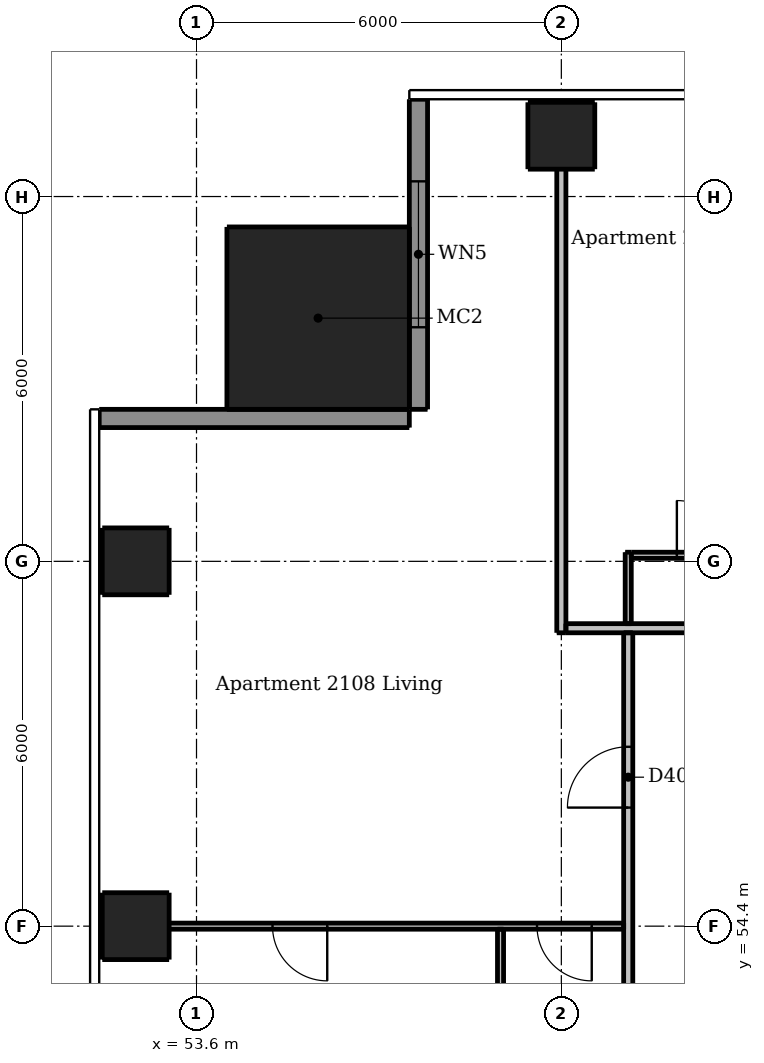
"""IFC4 building model, lengths in metres.
Left out: names, types, materials, properties, quantities, classifications, styles, units other than length and angle.
Written with IfcOpenShell. Run it as: python <this file> out.ifc"""

import sys

from ifc_helpers import new_model, si_unit, direction, frame, frame_2d, origin, origin_2d, place, context, subcontext, project, spatial, rectangle, extrude, element, fill, save


model = new_model("IFC4")
c1 = context("Model", 3, precision=1e-05, world=origin(), true_north=direction((0.0, 1.0)))
c2 = subcontext(c1, "Body", "Model", "MODEL_VIEW")
j1 = project(units=[si_unit("LENGTHUNIT", "METRE"), si_unit("PLANEANGLEUNIT", "RADIAN")], contexts=[c1])
p1 = place(None, origin())
s1 = spatial("IfcSite", under=j1, at=p1, CompositionType="ELEMENT")
p2 = place(p1, origin())
s2 = spatial("IfcBuilding", under=s1, at=p2, CompositionType="ELEMENT")
p3 = place(p2, frame((0.0, 0.0, 82.0)))
s3 = spatial("IfcBuildingStorey", under=s2, at=p3, CompositionType="ELEMENT", Elevation=82.0)
for number, where, z_axis, x_axis in (
    (1, (59.6, 67.4, 0.0), (0.0, 0.0, 1.0), (1.0, 0.0, 0.0)),
    (2, (52.6, 54.4, 0.0), (0.0, 0.0, 1.0), (1.0, 0.0, 0.0)),
    (3, (52.6, 60.4, 0.0), (0.0, 0.0, 1.0), (1.0, 0.0, 0.0)),
):
    element("IfcColumn", number, at=place(p3, frame(where, z_axis=z_axis, x_axis=x_axis)), inside=s3, PredefinedType="COLUMN", context=c2, shape_type="SweptSolid", body=[
        extrude(rectangle(XDim=1.1, YDim=1.1, at=origin_2d()), origin(), (0.0, 0.0, 1.0), 3.05),
    ])
p4 = place(p3, frame((55.6, 64.4, 0.0), z_axis=(0.0, 0.0, 1.0), x_axis=(1.0, 0.0, 0.0)))
e4 = element("IfcColumn", 4, at=p4, inside=s3, PredefinedType="COLUMN", context=c2, shape_type="SweptSolid", body=[
    extrude(rectangle(XDim=3.0, YDim=3.0, at=origin_2d()), origin(), (0.0, 0.0, 1.0), 3.3),
])
p5 = place(p3, frame((57.25, 68.0, 0.0), z_axis=(0.0, 0.0, 1.0), x_axis=(0.0, -1.0, 0.0)))
e5 = element("IfcWall", 5, at=p5, inside=s3, PredefinedType="SOLIDWALL", context=c2, shape_type="SweptSolid", body=[
    extrude(rectangle(XDim=5.1, YDim=0.3, at=frame_2d((2.55, 0.0))), origin(), (0.0, 0.0, 1.0), 3.05),
])
p6 = place(p5, frame((1.35, 0.0, 0.15)))
e6 = element("IfcOpeningElement", 6, at=p6, cuts=e5, PredefinedType="OPENING", context=c2, shape_type="SweptSolid", body=[
    extrude(rectangle(XDim=2.4, YDim=2.1, at=frame_2d((1.2, 1.05))), frame((0.0, 0.16, 0.0), z_axis=(0.0, -1.0, 0.0), x_axis=(1.0, 0.0, 0.0)), (0.0, 0.0, 1.0), 0.32),
])
p7 = place(p3, frame((57.1, 62.75, 0.0), z_axis=(0.0, 0.0, 1.0), x_axis=(-1.0, 0.0, 0.0)))
e7 = element("IfcWall", 7, at=p7, inside=s3, PredefinedType="SOLIDWALL", context=c2, shape_type="SweptSolid", body=[
    extrude(rectangle(XDim=5.1, YDim=0.3, at=frame_2d((2.55, 0.0))), origin(), (0.0, 0.0, 1.0), 3.05),
])
p8 = place(p3, frame((58.6, 54.35, 0.0), z_axis=(0.0, 0.0, 1.0), x_axis=(0.0, -1.0, 0.0)))
e8 = element("IfcWall", 8, at=p8, inside=s3, PredefinedType="PARTITIONING", context=c2, shape_type="SweptSolid", body=[
    extrude(rectangle(XDim=5.875, YDim=0.1, at=frame_2d((2.938, 0.0))), origin(), (0.0, 0.0, 1.0), 3.05),
])
p9 = place(p8, frame((3.75, 0.0, 0.0)))
e9 = element("IfcOpeningElement", 9, at=p9, cuts=e8, PredefinedType="OPENING", context=c2, shape_type="SweptSolid", body=[
    extrude(rectangle(XDim=0.8, YDim=2.1, at=frame_2d((0.4, 1.05))), frame((0.0, 0.06, 0.0), z_axis=(0.0, -1.0, 0.0), x_axis=(1.0, 0.0, 0.0)), (0.0, 0.0, 1.0), 0.12),
])
p10 = place(p3, frame((60.7, 59.375, 0.0), z_axis=(0.0, 0.0, 1.0), x_axis=(0.0, 1.0, 0.0)))
e10 = element("IfcWall", 10, at=p10, inside=s3, PredefinedType="PARTITIONING", context=c2, shape_type="SweptSolid", body=[
    extrude(rectangle(XDim=1.175, YDim=0.1, at=frame_2d((0.587, 0.0))), origin(), (0.0, 0.0, 1.0), 3.05),
])
p11 = place(p3, frame((60.75, 60.5, 0.0), z_axis=(0.0, 0.0, 1.0), x_axis=(1.0, 0.0, 0.0)))
e11 = element("IfcWall", 11, at=p11, inside=s3, PredefinedType="PARTITIONING", context=c2, shape_type="SweptSolid", body=[
    extrude(rectangle(XDim=16.775, YDim=0.1, at=frame_2d((8.387, 0.0))), origin(), (0.0, 0.0, 1.0), 3.05),
])
p12 = place(p11, frame((8.9, 0.0, 0.0)))
e12 = element("IfcOpeningElement", 12, at=p12, cuts=e11, PredefinedType="OPENING", context=c2, shape_type="SweptSolid", body=[
    extrude(rectangle(XDim=0.9, YDim=2.1, at=frame_2d((0.45, 1.05))), frame((0.0, 0.06, 0.0), z_axis=(0.0, -1.0, 0.0), x_axis=(1.0, 0.0, 0.0)), (0.0, 0.0, 1.0), 0.12),
])
p13 = place(p11, frame((14.9, 0.0, 0.0)))
e13 = element("IfcOpeningElement", 13, at=p13, cuts=e11, PredefinedType="OPENING", context=c2, shape_type="SweptSolid", body=[
    extrude(rectangle(XDim=0.9, YDim=2.1, at=frame_2d((0.45, 1.05))), frame((0.0, 0.06, 0.0), z_axis=(0.0, -1.0, 0.0), x_axis=(1.0, 0.0, 0.0)), (0.0, 0.0, 1.0), 0.12),
])
p14 = place(p11, frame((12.5, 0.0, 0.0)))
e14 = element("IfcOpeningElement", 14, at=p14, cuts=e11, PredefinedType="OPENING", context=c2, shape_type="SweptSolid", body=[
    extrude(rectangle(XDim=0.9, YDim=2.1, at=frame_2d((0.45, 1.05))), frame((0.0, 0.06, 0.0), z_axis=(0.0, -1.0, 0.0), x_axis=(1.0, 0.0, 0.0)), (0.0, 0.0, 1.0), 0.12),
])
p15 = place(p11, frame((5.35, 0.0, 0.0)))
e15 = element("IfcOpeningElement", 15, at=p15, cuts=e11, PredefinedType="OPENING", context=c2, shape_type="SweptSolid", body=[
    extrude(rectangle(XDim=0.8, YDim=2.1, at=frame_2d((0.4, 1.05))), frame((0.0, 0.06, 0.0), z_axis=(0.0, -1.0, 0.0), x_axis=(1.0, 0.0, 0.0)), (0.0, 0.0, 1.0), 0.12),
])
p16 = place(p11, frame((0.75, 0.0, 0.0)))
e16 = element("IfcOpeningElement", 16, at=p16, cuts=e11, PredefinedType="OPENING", context=c2, shape_type="SweptSolid", body=[
    extrude(rectangle(XDim=0.9, YDim=2.1, at=frame_2d((0.45, 1.05))), frame((0.0, 0.06, 0.0), z_axis=(0.0, -1.0, 0.0), x_axis=(1.0, 0.0, 0.0)), (0.0, 0.0, 1.0), 0.12),
])
p17 = place(p11, frame((3.25, 0.0, 0.0)))
e17 = element("IfcOpeningElement", 17, at=p17, cuts=e11, PredefinedType="OPENING", context=c2, shape_type="SweptSolid", body=[
    extrude(rectangle(XDim=0.8, YDim=2.1, at=frame_2d((0.4, 1.05))), frame((0.0, 0.06, 0.0), z_axis=(0.0, -1.0, 0.0), x_axis=(1.0, 0.0, 0.0)), (0.0, 0.0, 1.0), 0.12),
])
p18 = place(p3, frame((60.625, 54.4, 0.0), z_axis=(0.0, 0.0, 1.0), x_axis=(-1.0, 0.0, 0.0)))
e18 = element("IfcWall", 18, at=p18, inside=s3, PredefinedType="PARTITIONING", context=c2, shape_type="SweptSolid", body=[
    extrude(rectangle(XDim=8.625, YDim=0.1, at=frame_2d((4.312, 0.0))), origin(), (0.0, 0.0, 1.0), 2.516),
])
p19 = place(p18, frame((0.525, 0.0, 0.0)))
e19 = element("IfcOpeningElement", 19, at=p19, cuts=e18, PredefinedType="OPENING", context=c2, shape_type="SweptSolid", body=[
    extrude(rectangle(XDim=0.9, YDim=2.1, at=frame_2d((0.45, 1.05))), frame((0.0, 0.06, 0.0), z_axis=(0.0, -1.0, 0.0), x_axis=(1.0, 0.0, 0.0)), (0.0, 0.0, 1.0), 0.12),
])
p20 = place(p18, frame((4.875, 0.0, 0.0)))
e20 = element("IfcOpeningElement", 20, at=p20, cuts=e18, PredefinedType="OPENING", context=c2, shape_type="SweptSolid", body=[
    extrude(rectangle(XDim=0.9, YDim=2.1, at=frame_2d((0.45, 1.05))), frame((0.0, 0.06, 0.0), z_axis=(0.0, -1.0, 0.0), x_axis=(1.0, 0.0, 0.0)), (0.0, 0.0, 1.0), 0.12),
])
p21 = place(p3, frame((59.6, 59.225, 0.0), z_axis=(0.0, 0.0, 1.0), x_axis=(0.0, 1.0, 0.0)))
e21 = element("IfcWall", 21, at=p21, inside=s3, PredefinedType="PARTITIONING", context=c2, shape_type="SweptSolid", body=[
    extrude(rectangle(XDim=8.775, YDim=0.15, at=frame_2d((4.387, 0.0))), origin(), (0.0, 0.0, 1.0), 2.51),
])
p22 = place(p3, frame((60.7, 30.325, 0.0), z_axis=(0.0, 0.0, 1.0), x_axis=(0.0, 1.0, 0.0)))
e22 = element("IfcWall", 22, at=p22, inside=s3, PredefinedType="PARTITIONING", context=c2, shape_type="SweptSolid", body=[
    extrude(rectangle(XDim=28.9, YDim=0.15, at=frame_2d((14.45, 0.0))), origin(), (0.0, 0.0, 1.0), 3.05),
])
p23 = place(p22, frame((9.225, 0.0, 0.0)))
e23 = element("IfcOpeningElement", 23, at=p23, cuts=e22, PredefinedType="OPENING", context=c2, shape_type="SweptSolid", body=[
    extrude(rectangle(XDim=1.0, YDim=2.1, at=frame_2d((0.5, 1.05))), frame((0.0, 0.085, 0.0), z_axis=(0.0, -1.0, 0.0), x_axis=(1.0, 0.0, 0.0)), (0.0, 0.0, 1.0), 0.17),
])
p24 = place(p22, frame((26.025, 0.0, 0.0)))
e24 = element("IfcOpeningElement", 24, at=p24, cuts=e22, PredefinedType="OPENING", context=c2, shape_type="SweptSolid", body=[
    extrude(rectangle(XDim=1.0, YDim=2.1, at=frame_2d((0.5, 1.05))), frame((0.0, 0.085, 0.0), z_axis=(0.0, -1.0, 0.0), x_axis=(1.0, 0.0, 0.0)), (0.0, 0.0, 1.0), 0.17),
])
p25 = place(p3, frame((59.675, 59.3, 0.0), z_axis=(0.0, 0.0, 1.0), x_axis=(1.0, 0.0, 0.0)))
e25 = element("IfcWall", 25, at=p25, inside=s3, PredefinedType="PARTITIONING", context=c2, shape_type="SweptSolid", body=[
    extrude(rectangle(XDim=28.55, YDim=0.15, at=frame_2d((14.275, 0.0))), origin(), (0.0, 0.0, 1.0), 3.05),
])
p26 = place(p25, frame((8.975, 0.0, 0.0)))
e26 = element("IfcOpeningElement", 26, at=p26, cuts=e25, PredefinedType="OPENING", context=c2, shape_type="SweptSolid", body=[
    extrude(rectangle(XDim=1.0, YDim=2.1, at=frame_2d((0.5, 1.05))), frame((0.0, 0.085, 0.0), z_axis=(0.0, -1.0, 0.0), x_axis=(1.0, 0.0, 0.0)), (0.0, 0.0, 1.0), 0.17),
])
p27 = place(p25, frame((25.775, 0.0, 0.0)))
e27 = element("IfcOpeningElement", 27, at=p27, cuts=e25, PredefinedType="OPENING", context=c2, shape_type="SweptSolid", body=[
    extrude(rectangle(XDim=1.0, YDim=2.1, at=frame_2d((0.5, 1.05))), frame((0.0, 0.085, 0.0), z_axis=(0.0, -1.0, 0.0), x_axis=(1.0, 0.0, 0.0)), (0.0, 0.0, 1.0), 0.17),
])
p28 = place(p6, origin())
e28 = element("IfcWindow", 28, at=p28, inside=s3, PartitioningType="DOUBLE_PANEL_VERTICAL", PredefinedType="WINDOW", context=c2, shape_type="SweptSolid", body=[
    extrude(rectangle(XDim=2.4, YDim=2.1, at=frame_2d((1.2, 1.05))), frame((0.0, 0.03, 0.0), z_axis=(0.0, -1.0, 0.0), x_axis=(1.0, 0.0, 0.0)), (0.0, 0.0, 1.0), 0.06),
])
fill(e6, e28)
p29 = place(p16, origin())
e29 = element("IfcDoor", 29, at=p29, inside=s3, OperationType="SINGLE_SWING_LEFT", PredefinedType="DOOR", context=c2, shape_type="SweptSolid", body=[
    extrude(rectangle(XDim=0.9, YDim=2.1, at=frame_2d((0.45, 1.05))), frame((0.0, 0.025, 0.0), z_axis=(0.0, -1.0, 0.0), x_axis=(1.0, 0.0, 0.0)), (0.0, 0.0, 1.0), 0.05),
])
fill(e16, e29)
p30 = place(p24, origin())
e30 = element("IfcDoor", 30, at=p30, inside=s3, OperationType="SINGLE_SWING_LEFT", PredefinedType="DOOR", context=c2, shape_type="SweptSolid", body=[
    extrude(rectangle(XDim=1.0, YDim=2.1, at=frame_2d((0.5, 1.05))), frame((0.0, 0.025, 0.0), z_axis=(0.0, -1.0, 0.0), x_axis=(1.0, 0.0, 0.0)), (0.0, 0.0, 1.0), 0.05),
])
fill(e24, e30)
p31 = place(p19, origin())
e31 = element("IfcDoor", 31, at=p31, inside=s3, OperationType="SINGLE_SWING_LEFT", PredefinedType="DOOR", context=c2, shape_type="SweptSolid", body=[
    extrude(rectangle(XDim=0.9, YDim=2.1, at=frame_2d((0.45, 1.05))), frame((0.0, 0.025, 0.0), z_axis=(0.0, -1.0, 0.0), x_axis=(1.0, 0.0, 0.0)), (0.0, 0.0, 1.0), 0.05),
])
fill(e19, e31)
p32 = place(p20, origin())
e32 = element("IfcDoor", 32, at=p32, inside=s3, OperationType="SINGLE_SWING_LEFT", PredefinedType="DOOR", context=c2, shape_type="SweptSolid", body=[
    extrude(rectangle(XDim=0.9, YDim=2.1, at=frame_2d((0.45, 1.05))), frame((0.0, 0.025, 0.0), z_axis=(0.0, -1.0, 0.0), x_axis=(1.0, 0.0, 0.0)), (0.0, 0.0, 1.0), 0.05),
])
fill(e20, e32)
save(model, sys.argv[1])
